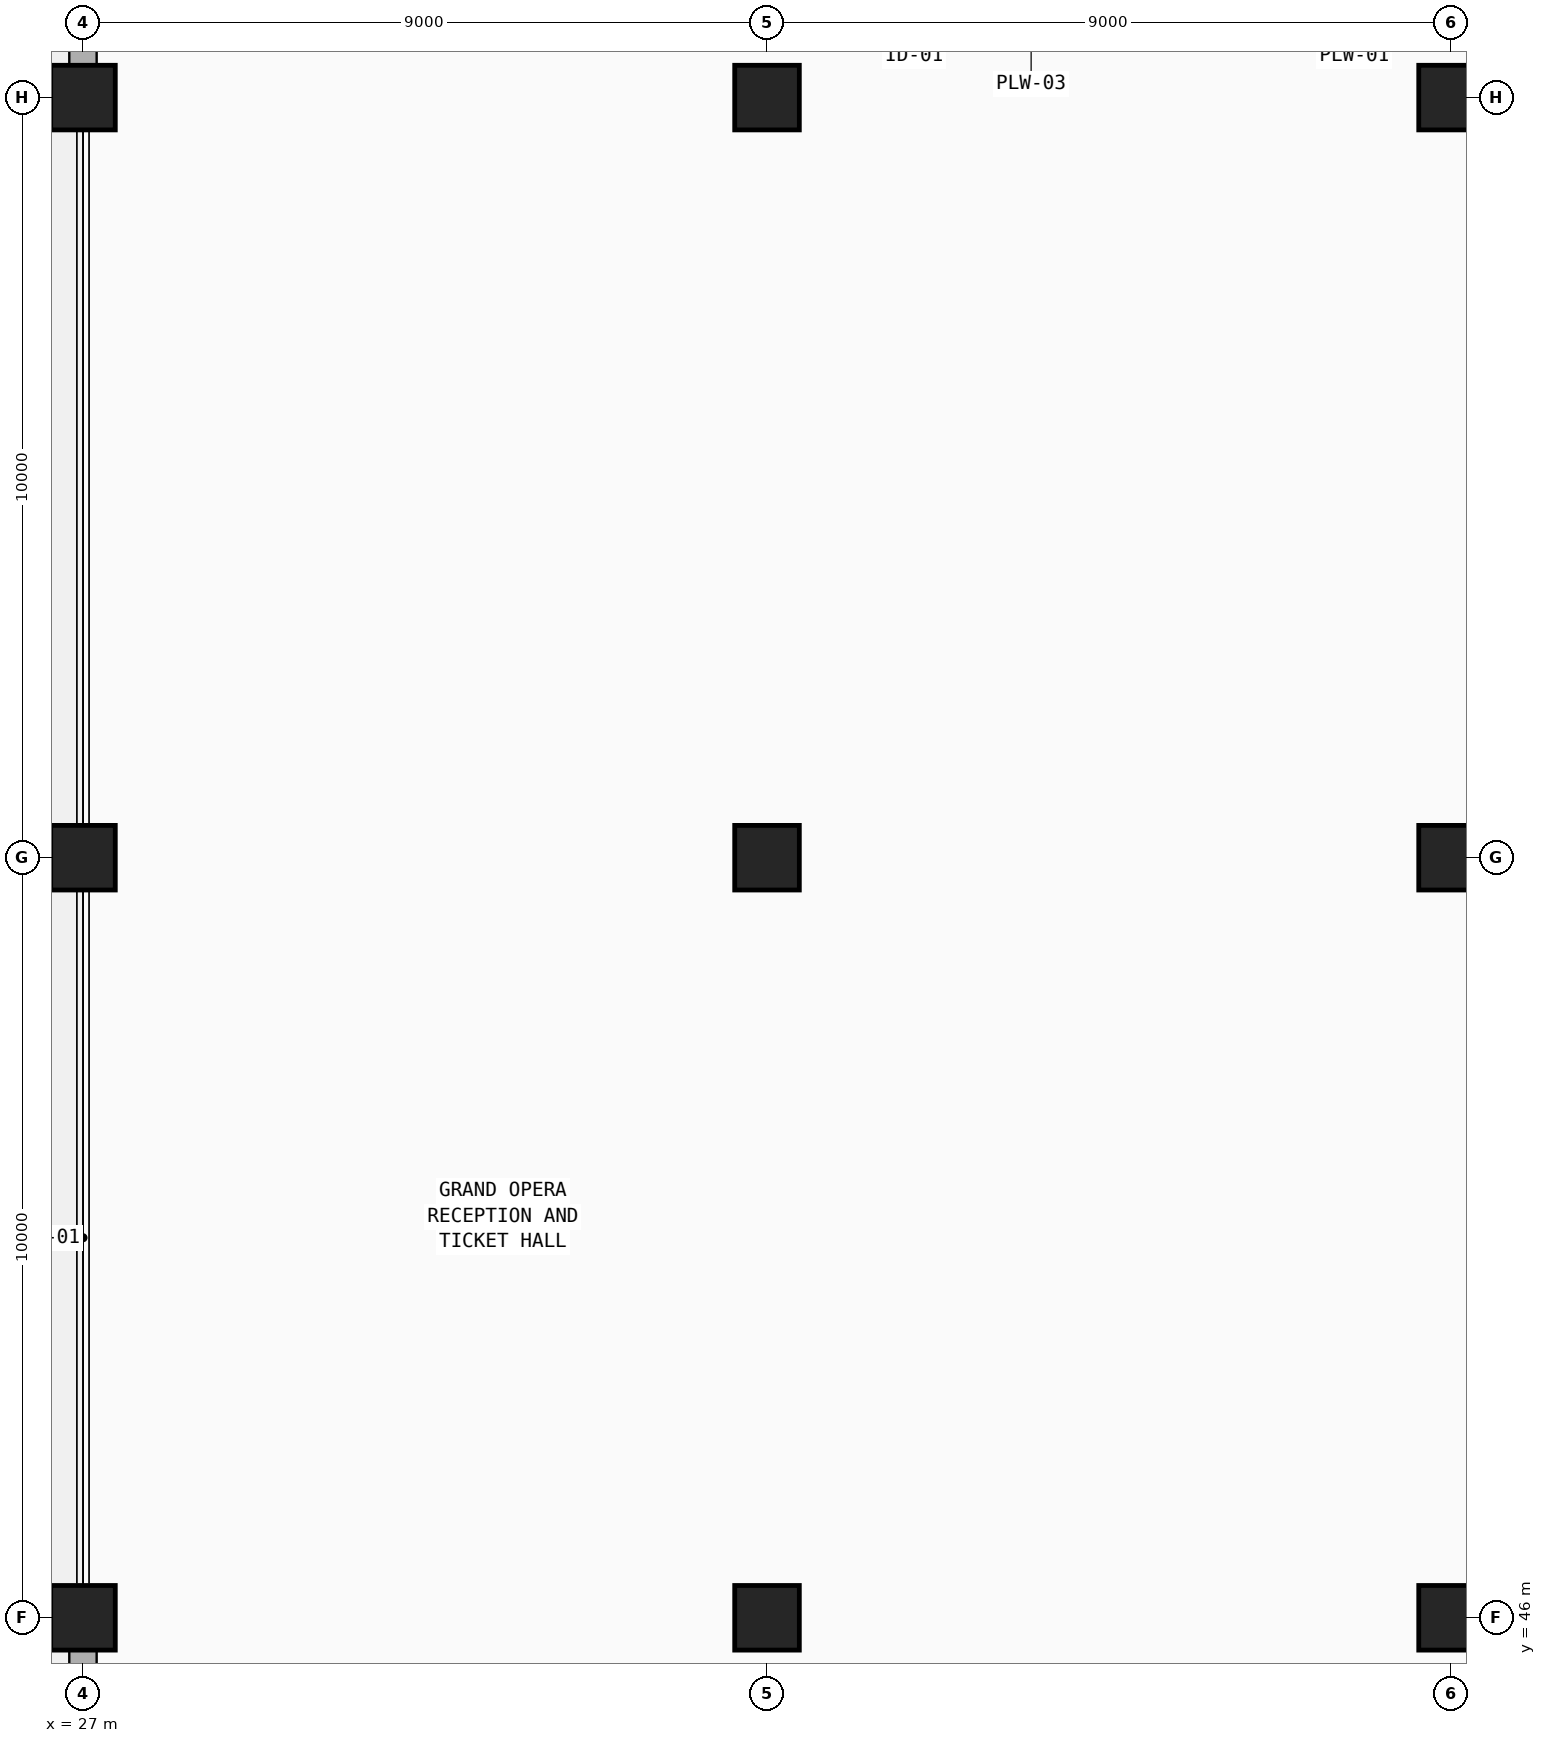
"""IFC4 building model, lengths in metres.
Left out: names, types, materials, properties, quantities, classifications, styles, units other than length and angle.
Written with IfcOpenShell. Run it as: python <this file> out.ifc"""

import sys

from ifc_helpers import new_model, si_unit, direction, frame, frame_2d, origin, origin_2d, place, context, subcontext, project, spatial, rectangle, extrude, element, save


model = new_model("IFC4")
c1 = context("Model", 3, precision=1e-05, world=origin(), true_north=direction((0.0, 1.0)))
c2 = subcontext(c1, "Body", "Model", "MODEL_VIEW")
j1 = project(units=[si_unit("LENGTHUNIT", "METRE"), si_unit("PLANEANGLEUNIT", "RADIAN")], contexts=[c1])
p1 = place(None, origin())
s1 = spatial("IfcSite", under=j1, at=p1, CompositionType="ELEMENT")
p2 = place(p1, origin())
s2 = spatial("IfcBuilding", under=s1, at=p2, CompositionType="ELEMENT")
p3 = place(p2, origin())
s3 = spatial("IfcBuildingStorey", under=s2, at=p3, CompositionType="ELEMENT", Elevation=0.0)
for number, where, z_axis, x_axis in (
    (1, (27.0, 46.0, 0.0), (0.0, 0.0, 1.0), (1.0, 0.0, 0.0)),
    (2, (27.0, 56.0, 0.0), (0.0, 0.0, 1.0), (1.0, 0.0, 0.0)),
    (3, (27.0, 66.0, 0.0), (0.0, 0.0, 1.0), (1.0, 0.0, 0.0)),
    (4, (36.0, 46.0, 0.0), (0.0, 0.0, 1.0), (1.0, 0.0, 0.0)),
    (5, (36.0, 56.0, 0.0), (0.0, 0.0, 1.0), (1.0, 0.0, 0.0)),
    (6, (36.0, 66.0, 0.0), (0.0, 0.0, 1.0), (1.0, 0.0, 0.0)),
    (7, (45.0, 46.0, 0.0), (0.0, 0.0, 1.0), (1.0, 0.0, 0.0)),
    (8, (45.0, 56.0, 0.0), (0.0, 0.0, 1.0), (1.0, 0.0, 0.0)),
    (9, (45.0, 66.0, 0.0), (0.0, 0.0, 1.0), (1.0, 0.0, 0.0)),
):
    element("IfcColumn", number, at=place(p3, frame(where, z_axis=z_axis, x_axis=x_axis)), inside=s3, PredefinedType="COLUMN", context=c2, shape_type="SweptSolid", body=[
        extrude(rectangle(XDim=0.85, YDim=0.85, at=origin_2d()), origin(), (0.0, 0.0, 1.0), 5.1),
    ])
p4 = place(p3, frame((27.0, 37.425, 0.0), z_axis=(0.0, 0.0, 1.0), x_axis=(0.0, 1.0, 0.0)))
e10 = element("IfcWall", 10, at=p4, inside=s3, PredefinedType="STANDARD", context=c2, shape_type="SweptSolid", body=[
    extrude(rectangle(XDim=8.15, YDim=0.36, at=frame_2d((4.075, 0.0))), origin(), (0.0, 0.0, 1.0), 4.0),
])
p5 = place(p4, frame((1.625, 0.0, 0.0)))
e11 = element("IfcOpeningElement", 11, at=p5, cuts=e10, PredefinedType="OPENING", context=c2, shape_type="SweptSolid", body=[
    extrude(rectangle(XDim=2.0, YDim=2.4, at=frame_2d((1.0, 1.2))), frame((0.0, 0.19, 0.0), z_axis=(0.0, -1.0, 0.0), x_axis=(1.0, 0.0, 0.0)), (0.0, 0.0, 1.0), 0.38),
])
p6 = place(p4, frame((4.625, 0.0, 0.0)))
e12 = element("IfcOpeningElement", 12, at=p6, cuts=e10, PredefinedType="OPENING", context=c2, shape_type="SweptSolid", body=[
    extrude(rectangle(XDim=2.0, YDim=2.4, at=frame_2d((1.0, 1.2))), frame((0.0, 0.19, 0.0), z_axis=(0.0, -1.0, 0.0), x_axis=(1.0, 0.0, 0.0)), (0.0, 0.0, 1.0), 0.38),
])
p7 = place(p3, frame((27.0, 66.425, 0.0), z_axis=(0.0, 0.0, 1.0), x_axis=(0.0, 1.0, 0.0)))
e13 = element("IfcWall", 13, at=p7, inside=s3, PredefinedType="STANDARD", context=c2, shape_type="SweptSolid", body=[
    extrude(rectangle(XDim=8.15, YDim=0.36, at=frame_2d((4.075, 0.0))), origin(), (0.0, 0.0, 1.0), 4.0),
])
p8 = place(p7, frame((1.625, 0.0, 0.0)))
e14 = element("IfcOpeningElement", 14, at=p8, cuts=e13, PredefinedType="OPENING", context=c2, shape_type="SweptSolid", body=[
    extrude(rectangle(XDim=2.0, YDim=2.4, at=frame_2d((1.0, 1.2))), frame((0.0, 0.19, 0.0), z_axis=(0.0, -1.0, 0.0), x_axis=(1.0, 0.0, 0.0)), (0.0, 0.0, 1.0), 0.38),
])
p9 = place(p7, frame((4.625, 0.0, 0.0)))
e15 = element("IfcOpeningElement", 15, at=p9, cuts=e13, PredefinedType="OPENING", context=c2, shape_type="SweptSolid", body=[
    extrude(rectangle(XDim=2.0, YDim=2.4, at=frame_2d((1.0, 1.2))), frame((0.0, 0.19, 0.0), z_axis=(0.0, -1.0, 0.0), x_axis=(1.0, 0.0, 0.0)), (0.0, 0.0, 1.0), 0.38),
])
save(model, sys.argv[1])
